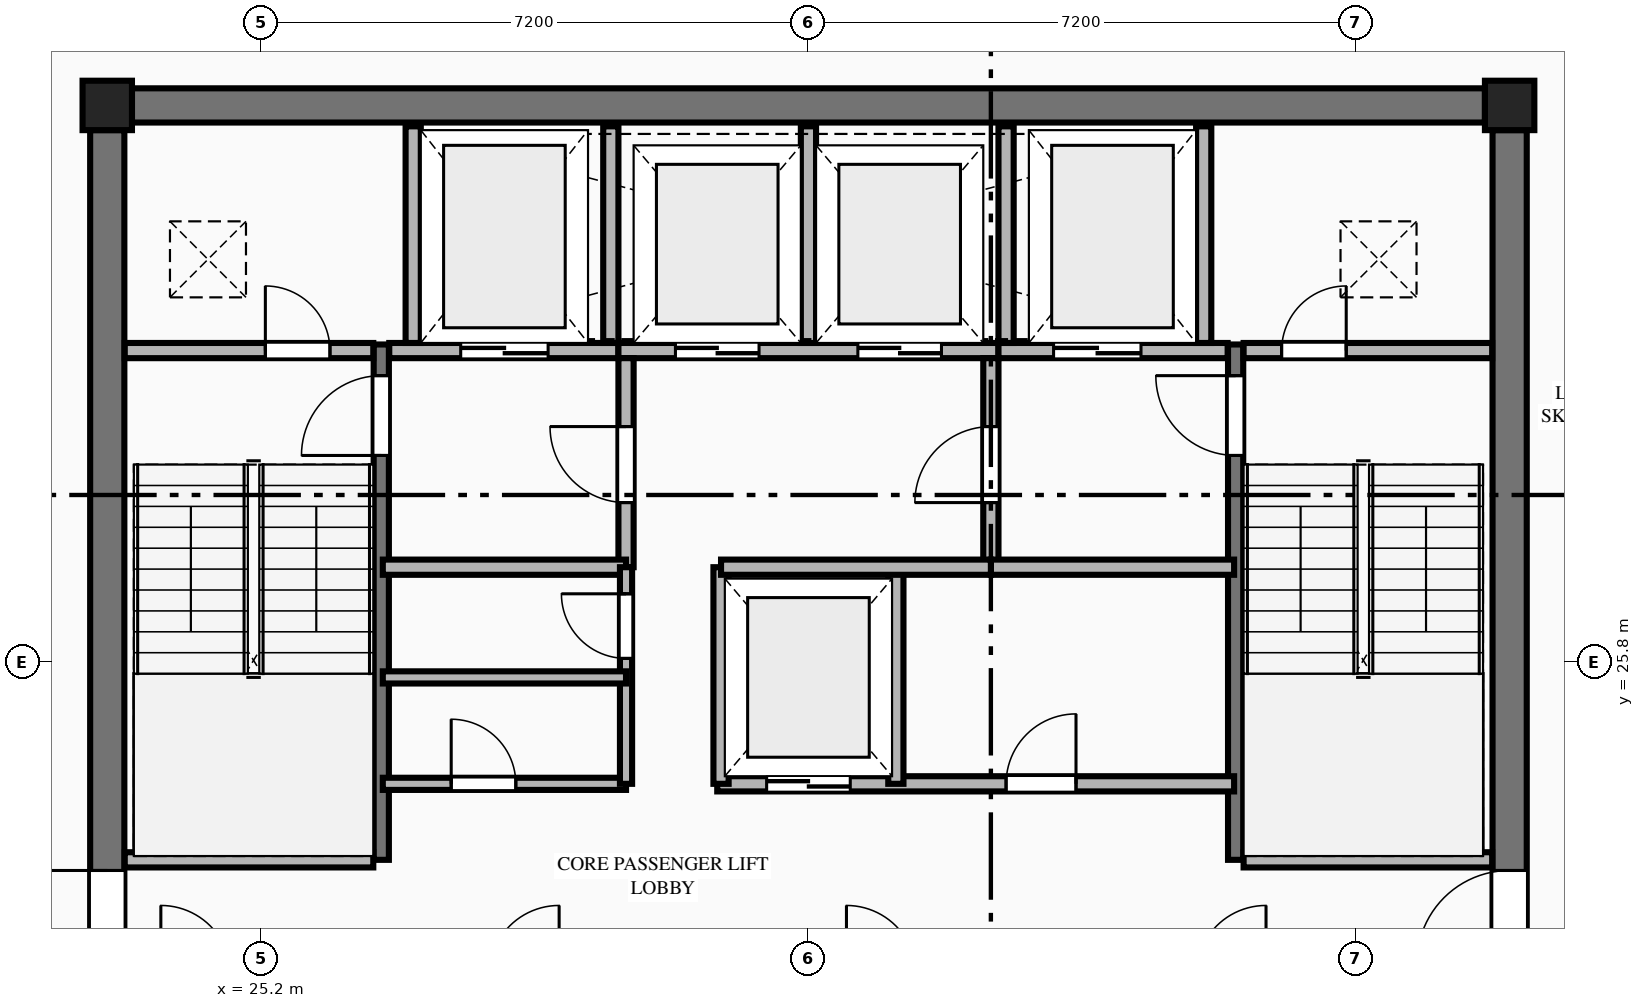
"""IFC4 building model, lengths in metres.
Left out: names, types, materials, properties, quantities, classifications, styles, units other than length and angle.
Written with IfcOpenShell. Run it as: python <this file> out.ifc"""

import sys

from ifc_helpers import new_model, si_unit, direction, frame, frame_2d, origin, origin_2d, place, context, subcontext, project, spatial, rectangle, extrude, element, fill, save


model = new_model("IFC4")
c1 = context("Model", 3, precision=1e-05, world=origin(), true_north=direction((0.0, 1.0)))
c2 = subcontext(c1, "Body", "Model", "MODEL_VIEW")
j1 = project(units=[si_unit("LENGTHUNIT", "METRE"), si_unit("PLANEANGLEUNIT", "RADIAN")], contexts=[c1])
p1 = place(None, origin())
s1 = spatial("IfcSite", under=j1, at=p1, CompositionType="ELEMENT")
p2 = place(p1, origin())
s2 = spatial("IfcBuilding", under=s1, at=p2, CompositionType="ELEMENT")
p3 = place(p2, frame((0.0, 0.0, 267.15)))
s3 = spatial("IfcBuildingStorey", under=s2, at=p3, CompositionType="ELEMENT", Elevation=267.15)
for number, where, z_axis, x_axis in (
    (1, (41.625, 33.125, 0.0), (0.0, 0.0, 1.0), (1.0, 0.0, 0.0)),
    (2, (23.175, 33.125, 0.0), (0.0, 0.0, 1.0), (1.0, 0.0, 0.0)),
):
    element("IfcColumn", number, at=place(p3, frame(where, z_axis=z_axis, x_axis=x_axis)), inside=s3, PredefinedType="COLUMN", context=c2, shape_type="SweptSolid", body=[
        extrude(rectangle(XDim=0.65, YDim=0.65, at=origin_2d()), origin(), (0.0, 0.0, 1.0), 3.65),
    ])
p4 = place(p3, frame((23.5, 33.125, 0.0), z_axis=(0.0, 0.0, 1.0), x_axis=(1.0, 0.0, 0.0)))
e3 = element("IfcWall", 3, at=p4, inside=s3, PredefinedType="SHEAR", context=c2, shape_type="SweptSolid", body=[
    extrude(rectangle(XDim=17.8, YDim=0.45, at=frame_2d((8.9, 0.0))), origin(), (0.0, 0.0, 1.0), 3.45),
])
p5 = place(p3, frame((23.175, 19.0, 0.0), z_axis=(0.0, 0.0, 1.0), x_axis=(0.0, 1.0, 0.0)))
e4 = element("IfcWall", 4, at=p5, inside=s3, PredefinedType="SHEAR", context=c2, shape_type="SweptSolid", body=[
    extrude(rectangle(XDim=13.8, YDim=0.45, at=frame_2d((6.9, 0.0))), origin(), (0.0, 0.0, 1.0), 3.45),
])
p6 = place(p5, frame((2.84, 0.0, 0.0)))
e5 = element("IfcOpeningElement", 5, at=p6, cuts=e4, PredefinedType="OPENING", context=c2, shape_type="SweptSolid", body=[
    extrude(rectangle(XDim=1.22, YDim=2.25, at=frame_2d((0.61, 1.125))), frame((0.0, 0.235, 0.0), z_axis=(0.0, -1.0, 0.0), x_axis=(1.0, 0.0, 0.0)), (0.0, 0.0, 1.0), 0.47),
])
p7 = place(p3, frame((41.625, 19.0, 0.0), z_axis=(0.0, 0.0, 1.0), x_axis=(0.0, 1.0, 0.0)))
e6 = element("IfcWall", 6, at=p7, inside=s3, PredefinedType="SHEAR", context=c2, shape_type="SweptSolid", body=[
    extrude(rectangle(XDim=13.8, YDim=0.45, at=frame_2d((6.9, 0.0))), origin(), (0.0, 0.0, 1.0), 3.45),
])
p8 = place(p7, frame((2.84, 0.0, 0.0)))
e7 = element("IfcOpeningElement", 7, at=p8, cuts=e6, PredefinedType="OPENING", context=c2, shape_type="SweptSolid", body=[
    extrude(rectangle(XDim=1.22, YDim=2.25, at=frame_2d((0.61, 1.125))), frame((0.0, 0.235, 0.0), z_axis=(0.0, -1.0, 0.0), x_axis=(1.0, 0.0, 0.0)), (0.0, 0.0, 1.0), 0.47),
])
p9 = place(p3, frame((26.78, 23.2, 0.0), z_axis=(0.0, 0.0, 1.0), x_axis=(0.0, 1.0, 0.0)))
e8 = element("IfcWall", 8, at=p9, inside=s3, PredefinedType="SHEAR", context=c2, shape_type="SweptSolid", body=[
    extrude(rectangle(XDim=6.78, YDim=0.2, at=frame_2d((3.39, 0.0))), origin(), (0.0, 0.0, 1.0), 3.65),
])
p10 = place(p9, frame((5.32, 0.0, 0.0)))
e9 = element("IfcOpeningElement", 9, at=p10, cuts=e8, PredefinedType="OPENING", context=c2, shape_type="SweptSolid", body=[
    extrude(rectangle(XDim=1.05, YDim=2.15, at=frame_2d((0.525, 1.075))), frame((0.0, 0.11, 0.0), z_axis=(0.0, -1.0, 0.0), x_axis=(1.0, 0.0, 0.0)), (0.0, 0.0, 1.0), 0.22),
])
p11 = place(p3, frame((23.405, 23.2, 0.0), z_axis=(0.0, 0.0, 1.0), x_axis=(1.0, 0.0, 0.0)))
e10 = element("IfcWall", 10, at=p11, inside=s3, PredefinedType="PLUMBINGWALL", context=c2, shape_type="SweptSolid", body=[
    extrude(rectangle(XDim=3.27, YDim=0.2, at=frame_2d((1.635, 0.0))), origin(), (0.0, 0.0, 1.0), 3.45),
])
p12 = place(p3, frame((38.02, 23.2, 0.0), z_axis=(0.0, 0.0, 1.0), x_axis=(0.0, 1.0, 0.0)))
e11 = element("IfcWall", 11, at=p12, inside=s3, PredefinedType="SHEAR", context=c2, shape_type="SweptSolid", body=[
    extrude(rectangle(XDim=6.78, YDim=0.2, at=frame_2d((3.39, 0.0))), origin(), (0.0, 0.0, 1.0), 3.65),
])
p13 = place(p12, frame((5.32, 0.0, 0.0)))
e12 = element("IfcOpeningElement", 12, at=p13, cuts=e11, PredefinedType="OPENING", context=c2, shape_type="SweptSolid", body=[
    extrude(rectangle(XDim=1.05, YDim=2.15, at=frame_2d((0.525, 1.075))), frame((0.0, 0.11, 0.0), z_axis=(0.0, -1.0, 0.0), x_axis=(1.0, 0.0, 0.0)), (0.0, 0.0, 1.0), 0.22),
])
p14 = place(p3, frame((38.125, 23.2, 0.0), z_axis=(0.0, 0.0, 1.0), x_axis=(1.0, 0.0, 0.0)))
e13 = element("IfcWall", 13, at=p14, inside=s3, PredefinedType="PLUMBINGWALL", context=c2, shape_type="SweptSolid", body=[
    extrude(rectangle(XDim=3.27, YDim=0.2, at=frame_2d((1.635, 0.0))), origin(), (0.0, 0.0, 1.0), 3.45),
])
p15 = place(p3, frame((23.405, 29.9, 0.0), z_axis=(0.0, 0.0, 1.0), x_axis=(1.0, 0.0, 0.0)))
e14 = element("IfcWall", 14, at=p15, inside=s3, PredefinedType="PLUMBINGWALL", context=c2, shape_type="SweptSolid", body=[
    extrude(rectangle(XDim=3.27, YDim=0.2, at=frame_2d((1.635, 0.0))), origin(), (0.0, 0.0, 1.0), 3.45),
])
p16 = place(p15, frame((1.85, 0.0, 0.0)))
e15 = element("IfcOpeningElement", 15, at=p16, cuts=e14, PredefinedType="OPENING", context=c2, shape_type="SweptSolid", body=[
    extrude(rectangle(XDim=0.85, YDim=2.05, at=frame_2d((0.425, 1.025))), frame((0.0, 0.11, 0.0), z_axis=(0.0, -1.0, 0.0), x_axis=(1.0, 0.0, 0.0)), (0.0, 0.0, 1.0), 0.22),
])
p17 = place(p3, frame((26.885, 29.9, 0.0), z_axis=(0.0, 0.0, 1.0), x_axis=(1.0, 0.0, 0.0)))
e16 = element("IfcWall", 16, at=p17, inside=s3, PredefinedType="PLUMBINGWALL", context=c2, shape_type="SweptSolid", body=[
    extrude(rectangle(XDim=3.015, YDim=0.2, at=frame_2d((1.507, 0.0))), origin(), (0.0, 0.0, 1.0), 3.45),
])
p18 = place(p17, frame((0.94, 0.0, 0.0)))
e17 = element("IfcOpeningElement", 17, at=p18, cuts=e16, PredefinedType="OPENING", context=c2, shape_type="SweptSolid", body=[
    extrude(rectangle(XDim=1.15, YDim=2.2, at=frame_2d((0.575, 1.1))), frame((0.0, 0.11, 0.0), z_axis=(0.0, -1.0, 0.0), x_axis=(1.0, 0.0, 0.0)), (0.0, 0.0, 1.0), 0.22),
])
p19 = place(p3, frame((29.9, 29.9, 0.0), z_axis=(0.0, 0.0, 1.0), x_axis=(1.0, 0.0, 0.0)))
e18 = element("IfcWall", 18, at=p19, inside=s3, PredefinedType="PLUMBINGWALL", context=c2, shape_type="SweptSolid", body=[
    extrude(rectangle(XDim=5.0, YDim=0.2, at=frame_2d((2.5, 0.0))), origin(), (0.0, 0.0, 1.0), 3.45),
])
p20 = place(p19, frame((0.75, 0.0, 0.0)))
e19 = element("IfcOpeningElement", 19, at=p20, cuts=e18, PredefinedType="OPENING", context=c2, shape_type="SweptSolid", body=[
    extrude(rectangle(XDim=1.1, YDim=2.2, at=frame_2d((0.55, 1.1))), frame((0.0, 0.11, 0.0), z_axis=(0.0, -1.0, 0.0), x_axis=(1.0, 0.0, 0.0)), (0.0, 0.0, 1.0), 0.22),
])
p21 = place(p19, frame((3.15, 0.0, 0.0)))
e20 = element("IfcOpeningElement", 20, at=p21, cuts=e18, PredefinedType="OPENING", context=c2, shape_type="SweptSolid", body=[
    extrude(rectangle(XDim=1.1, YDim=2.2, at=frame_2d((0.55, 1.1))), frame((0.0, 0.11, 0.0), z_axis=(0.0, -1.0, 0.0), x_axis=(1.0, 0.0, 0.0)), (0.0, 0.0, 1.0), 0.22),
])
p22 = place(p3, frame((34.9, 29.9, 0.0), z_axis=(0.0, 0.0, 1.0), x_axis=(1.0, 0.0, 0.0)))
e21 = element("IfcWall", 21, at=p22, inside=s3, PredefinedType="PLUMBINGWALL", context=c2, shape_type="SweptSolid", body=[
    extrude(rectangle(XDim=3.015, YDim=0.2, at=frame_2d((1.508, 0.0))), origin(), (0.0, 0.0, 1.0), 3.45),
])
p23 = place(p22, frame((0.725, 0.0, 0.0)))
e22 = element("IfcOpeningElement", 22, at=p23, cuts=e21, PredefinedType="OPENING", context=c2, shape_type="SweptSolid", body=[
    extrude(rectangle(XDim=1.15, YDim=2.2, at=frame_2d((0.575, 1.1))), frame((0.0, 0.11, 0.0), z_axis=(0.0, -1.0, 0.0), x_axis=(1.0, 0.0, 0.0)), (0.0, 0.0, 1.0), 0.22),
])
p24 = place(p3, frame((38.125, 29.9, 0.0), z_axis=(0.0, 0.0, 1.0), x_axis=(1.0, 0.0, 0.0)))
e23 = element("IfcWall", 23, at=p24, inside=s3, PredefinedType="PLUMBINGWALL", context=c2, shape_type="SweptSolid", body=[
    extrude(rectangle(XDim=3.27, YDim=0.2, at=frame_2d((1.635, 0.0))), origin(), (0.0, 0.0, 1.0), 3.45),
])
p25 = place(p24, frame((0.5, 0.0, 0.0)))
e24 = element("IfcOpeningElement", 24, at=p25, cuts=e23, PredefinedType="OPENING", context=c2, shape_type="SweptSolid", body=[
    extrude(rectangle(XDim=0.85, YDim=2.05, at=frame_2d((0.425, 1.025))), frame((0.0, 0.11, 0.0), z_axis=(0.0, -1.0, 0.0), x_axis=(1.0, 0.0, 0.0)), (0.0, 0.0, 1.0), 0.22),
])
for number, where, z_axis, x_axis in (
    (25, (27.2, 30.0, 0.0), (0.0, 0.0, 1.0), (0.0, 1.0, 0.0)),
    (26, (29.8, 30.0, 0.0), (0.0, 0.0, 1.0), (0.0, 1.0, 0.0)),
    (27, (32.4, 30.0, 0.0), (0.0, 0.0, 1.0), (0.0, 1.0, 0.0)),
    (28, (35.0, 30.0, 0.0), (0.0, 0.0, 1.0), (0.0, 1.0, 0.0)),
    (29, (37.6, 30.0, 0.0), (0.0, 0.0, 1.0), (0.0, 1.0, 0.0)),
):
    element("IfcWall", number, at=place(p3, frame(where, z_axis=z_axis, x_axis=x_axis)), inside=s3, PredefinedType="PLUMBINGWALL", context=c2, shape_type="SweptSolid", body=[
        extrude(rectangle(XDim=2.85, YDim=0.2, at=frame_2d((1.425, 0.0))), origin(), (0.0, 0.0, 1.0), 3.45),
    ])
p26 = place(p3, frame((30.0, 27.05, 0.0), z_axis=(0.0, 0.0, 1.0), x_axis=(0.0, 1.0, 0.0)))
e30 = element("IfcWall", 30, at=p26, inside=s3, PredefinedType="PLUMBINGWALL", context=c2, shape_type="SweptSolid", body=[
    extrude(rectangle(XDim=2.75, YDim=0.2, at=frame_2d((1.375, 0.0))), origin(), (0.0, 0.0, 1.0), 3.45),
])
p27 = place(p26, frame((0.85, 0.0, 0.0)))
e31 = element("IfcOpeningElement", 31, at=p27, cuts=e30, PredefinedType="OPENING", context=c2, shape_type="SweptSolid", body=[
    extrude(rectangle(XDim=1.0, YDim=2.15, at=frame_2d((0.5, 1.075))), frame((0.0, 0.11, 0.0), z_axis=(0.0, -1.0, 0.0), x_axis=(1.0, 0.0, 0.0)), (0.0, 0.0, 1.0), 0.22),
])
p28 = place(p3, frame((26.8, 27.05, 0.0), z_axis=(0.0, 0.0, 1.0), x_axis=(1.0, 0.0, 0.0)))
e32 = element("IfcWall", 32, at=p28, inside=s3, PredefinedType="PLUMBINGWALL", context=c2, shape_type="SweptSolid", body=[
    extrude(rectangle(XDim=3.2, YDim=0.2, at=frame_2d((1.6, 0.0))), origin(), (0.0, 0.0, 1.0), 3.45),
])
p29 = place(p3, frame((34.8, 27.05, 0.0), z_axis=(0.0, 0.0, 1.0), x_axis=(0.0, 1.0, 0.0)))
e33 = element("IfcWall", 33, at=p29, inside=s3, PredefinedType="PLUMBINGWALL", context=c2, shape_type="SweptSolid", body=[
    extrude(rectangle(XDim=2.75, YDim=0.2, at=frame_2d((1.375, 0.0))), origin(), (0.0, 0.0, 1.0), 3.45),
])
p30 = place(p29, frame((0.85, 0.0, 0.0)))
e34 = element("IfcOpeningElement", 34, at=p30, cuts=e33, PredefinedType="OPENING", context=c2, shape_type="SweptSolid", body=[
    extrude(rectangle(XDim=1.0, YDim=2.15, at=frame_2d((0.5, 1.075))), frame((0.0, 0.11, 0.0), z_axis=(0.0, -1.0, 0.0), x_axis=(1.0, 0.0, 0.0)), (0.0, 0.0, 1.0), 0.22),
])
p31 = place(p3, frame((34.8, 27.05, 0.0), z_axis=(0.0, 0.0, 1.0), x_axis=(1.0, 0.0, 0.0)))
e35 = element("IfcWall", 35, at=p31, inside=s3, PredefinedType="PLUMBINGWALL", context=c2, shape_type="SweptSolid", body=[
    extrude(rectangle(XDim=3.2, YDim=0.2, at=frame_2d((1.6, 0.0))), origin(), (0.0, 0.0, 1.0), 3.45),
])
p32 = place(p3, frame((26.8, 24.2, 0.0), z_axis=(0.0, 0.0, 1.0), x_axis=(1.0, 0.0, 0.0)))
e36 = element("IfcWall", 36, at=p32, inside=s3, PredefinedType="PARTITIONING", context=c2, shape_type="SweptSolid", body=[
    extrude(rectangle(XDim=3.2, YDim=0.16, at=frame_2d((1.6, 0.0))), origin(), (0.0, 0.0, 1.0), 3.45),
])
p33 = place(p32, frame((0.9, 0.0, 0.0)))
e37 = element("IfcOpeningElement", 37, at=p33, cuts=e36, PredefinedType="OPENING", context=c2, shape_type="SweptSolid", body=[
    extrude(rectangle(XDim=0.85, YDim=2.05, at=frame_2d((0.425, 1.025))), frame((0.0, 0.09, 0.0), z_axis=(0.0, -1.0, 0.0), x_axis=(1.0, 0.0, 0.0)), (0.0, 0.0, 1.0), 0.18),
])
p34 = place(p3, frame((30.0, 24.2, 0.0), z_axis=(0.0, 0.0, 1.0), x_axis=(0.0, 1.0, 0.0)))
e38 = element("IfcWall", 38, at=p34, inside=s3, PredefinedType="PARTITIONING", context=c2, shape_type="SweptSolid", body=[
    extrude(rectangle(XDim=2.85, YDim=0.16, at=frame_2d((1.425, 0.0))), origin(), (0.0, 0.0, 1.0), 3.45),
])
p35 = place(p34, frame((1.65, 0.0, 0.0)))
e39 = element("IfcOpeningElement", 39, at=p35, cuts=e38, PredefinedType="OPENING", context=c2, shape_type="SweptSolid", body=[
    extrude(rectangle(XDim=0.85, YDim=2.05, at=frame_2d((0.425, 1.025))), frame((0.0, 0.09, 0.0), z_axis=(0.0, -1.0, 0.0), x_axis=(1.0, 0.0, 0.0)), (0.0, 0.0, 1.0), 0.18),
])
p36 = place(p3, frame((31.2, 24.2, 0.0), z_axis=(0.0, 0.0, 1.0), x_axis=(1.0, 0.0, 0.0)))
e40 = element("IfcWall", 40, at=p36, inside=s3, PredefinedType="PLUMBINGWALL", context=c2, shape_type="SweptSolid", body=[
    extrude(rectangle(XDim=6.8, YDim=0.2, at=frame_2d((3.4, 0.0))), origin(), (0.0, 0.0, 1.0), 3.45),
])
p37 = place(p36, frame((0.65, 0.0, 0.0)))
e41 = element("IfcOpeningElement", 41, at=p37, cuts=e40, PredefinedType="OPENING", context=c2, shape_type="SweptSolid", body=[
    extrude(rectangle(XDim=1.1, YDim=2.2, at=frame_2d((0.55, 1.1))), frame((0.0, 0.11, 0.0), z_axis=(0.0, -1.0, 0.0), x_axis=(1.0, 0.0, 0.0)), (0.0, 0.0, 1.0), 0.22),
])
p38 = place(p36, frame((3.8, 0.0, 0.0)))
e42 = element("IfcOpeningElement", 42, at=p38, cuts=e40, PredefinedType="OPENING", context=c2, shape_type="SweptSolid", body=[
    extrude(rectangle(XDim=0.92, YDim=2.15, at=frame_2d((0.46, 1.075))), frame((0.0, 0.11, 0.0), z_axis=(0.0, -1.0, 0.0), x_axis=(1.0, 0.0, 0.0)), (0.0, 0.0, 1.0), 0.22),
])
for number, where, z_axis, x_axis in (
    (43, (31.25, 24.2, 0.0), (0.0, 0.0, 1.0), (0.0, 1.0, 0.0)),
    (44, (33.55, 24.2, 0.0), (0.0, 0.0, 1.0), (0.0, 1.0, 0.0)),
):
    element("IfcWall", number, at=place(p3, frame(where, z_axis=z_axis, x_axis=x_axis)), inside=s3, PredefinedType="PLUMBINGWALL", context=c2, shape_type="SweptSolid", body=[
        extrude(rectangle(XDim=2.85, YDim=0.2, at=frame_2d((1.425, 0.0))), origin(), (0.0, 0.0, 1.0), 3.45),
    ])
p39 = place(p3, frame((31.25, 27.05, 0.0), z_axis=(0.0, 0.0, 1.0), x_axis=(1.0, 0.0, 0.0)))
e45 = element("IfcWall", 45, at=p39, inside=s3, PredefinedType="PLUMBINGWALL", context=c2, shape_type="SweptSolid", body=[
    extrude(rectangle(XDim=3.55, YDim=0.2, at=frame_2d((1.775, 0.0))), origin(), (0.0, 0.0, 1.0), 3.45),
])
p40 = place(p3, frame((26.8, 25.6, 0.0), z_axis=(0.0, 0.0, 1.0), x_axis=(1.0, 0.0, 0.0)))
e46 = element("IfcWall", 46, at=p40, inside=s3, PredefinedType="PARTITIONING", context=c2, shape_type="SweptSolid", body=[
    extrude(rectangle(XDim=3.2, YDim=0.16, at=frame_2d((1.6, 0.0))), origin(), (0.0, 0.0, 1.0), 3.45),
])
p41 = place(p6, origin())
e47 = element("IfcDoor", 47, at=p41, inside=s3, OperationType="SINGLE_SWING_RIGHT", PredefinedType="DOOR", context=c2, shape_type="SweptSolid", body=[
    extrude(rectangle(XDim=1.22, YDim=2.25, at=frame_2d((0.61, 1.125))), frame((0.0, 0.025, 0.0), z_axis=(0.0, -1.0, 0.0), x_axis=(1.0, 0.0, 0.0)), (0.0, 0.0, 1.0), 0.05),
])
fill(e5, e47)
p42 = place(p8, origin())
e48 = element("IfcDoor", 48, at=p42, inside=s3, OperationType="SINGLE_SWING_LEFT", PredefinedType="DOOR", context=c2, shape_type="SweptSolid", body=[
    extrude(rectangle(XDim=1.22, YDim=2.25, at=frame_2d((0.61, 1.125))), frame((0.0, 0.025, 0.0), z_axis=(0.0, -1.0, 0.0), x_axis=(1.0, 0.0, 0.0)), (0.0, 0.0, 1.0), 0.05),
])
fill(e7, e48)
p43 = place(p10, origin())
e49 = element("IfcDoor", 49, at=p43, inside=s3, OperationType="SINGLE_SWING_LEFT", PredefinedType="DOOR", context=c2, shape_type="SweptSolid", body=[
    extrude(rectangle(XDim=1.05, YDim=2.15, at=frame_2d((0.525, 1.075))), frame((0.0, 0.025, 0.0), z_axis=(0.0, -1.0, 0.0), x_axis=(1.0, 0.0, 0.0)), (0.0, 0.0, 1.0), 0.05),
])
fill(e9, e49)
p44 = place(p13, origin())
e50 = element("IfcDoor", 50, at=p44, inside=s3, OperationType="SINGLE_SWING_RIGHT", PredefinedType="DOOR", context=c2, shape_type="SweptSolid", body=[
    extrude(rectangle(XDim=1.05, YDim=2.15, at=frame_2d((0.525, 1.075))), frame((0.0, 0.025, 0.0), z_axis=(0.0, -1.0, 0.0), x_axis=(1.0, 0.0, 0.0)), (0.0, 0.0, 1.0), 0.05),
])
fill(e12, e50)
p45 = place(p16, origin())
e51 = element("IfcDoor", 51, at=p45, inside=s3, OperationType="SINGLE_SWING_LEFT", PredefinedType="DOOR", context=c2, shape_type="SweptSolid", body=[
    extrude(rectangle(XDim=0.85, YDim=2.05, at=frame_2d((0.425, 1.025))), frame((0.0, 0.025, 0.0), z_axis=(0.0, -1.0, 0.0), x_axis=(1.0, 0.0, 0.0)), (0.0, 0.0, 1.0), 0.05),
])
fill(e15, e51)
p46 = place(p25, origin())
e52 = element("IfcDoor", 52, at=p46, inside=s3, OperationType="SINGLE_SWING_RIGHT", PredefinedType="DOOR", context=c2, shape_type="SweptSolid", body=[
    extrude(rectangle(XDim=0.85, YDim=2.05, at=frame_2d((0.425, 1.025))), frame((0.0, 0.025, 0.0), z_axis=(0.0, -1.0, 0.0), x_axis=(1.0, 0.0, 0.0)), (0.0, 0.0, 1.0), 0.05),
])
fill(e24, e52)
p47 = place(p18, origin())
e53 = element("IfcDoor", 53, at=p47, inside=s3, OperationType="DOUBLE_DOOR_SLIDING", PredefinedType="DOOR", context=c2, shape_type="SweptSolid", body=[
    extrude(rectangle(XDim=1.15, YDim=2.2, at=frame_2d((0.575, 1.1))), frame((0.0, 0.025, 0.0), z_axis=(0.0, -1.0, 0.0), x_axis=(1.0, 0.0, 0.0)), (0.0, 0.0, 1.0), 0.05),
])
fill(e17, e53)
p48 = place(p23, origin())
e54 = element("IfcDoor", 54, at=p48, inside=s3, OperationType="DOUBLE_DOOR_SLIDING", PredefinedType="DOOR", context=c2, shape_type="SweptSolid", body=[
    extrude(rectangle(XDim=1.15, YDim=2.2, at=frame_2d((0.575, 1.1))), frame((0.0, 0.025, 0.0), z_axis=(0.0, -1.0, 0.0), x_axis=(1.0, 0.0, 0.0)), (0.0, 0.0, 1.0), 0.05),
])
fill(e22, e54)
p49 = place(p20, origin())
e55 = element("IfcDoor", 55, at=p49, inside=s3, OperationType="DOUBLE_DOOR_SLIDING", PredefinedType="DOOR", context=c2, shape_type="SweptSolid", body=[
    extrude(rectangle(XDim=1.1, YDim=2.2, at=frame_2d((0.55, 1.1))), frame((0.0, 0.025, 0.0), z_axis=(0.0, -1.0, 0.0), x_axis=(1.0, 0.0, 0.0)), (0.0, 0.0, 1.0), 0.05),
])
fill(e19, e55)
p50 = place(p21, origin())
e56 = element("IfcDoor", 56, at=p50, inside=s3, OperationType="DOUBLE_DOOR_SLIDING", PredefinedType="DOOR", context=c2, shape_type="SweptSolid", body=[
    extrude(rectangle(XDim=1.1, YDim=2.2, at=frame_2d((0.55, 1.1))), frame((0.0, 0.025, 0.0), z_axis=(0.0, -1.0, 0.0), x_axis=(1.0, 0.0, 0.0)), (0.0, 0.0, 1.0), 0.05),
])
fill(e20, e56)
p51 = place(p27, origin())
e57 = element("IfcDoor", 57, at=p51, inside=s3, OperationType="SINGLE_SWING_RIGHT", PredefinedType="DOOR", context=c2, shape_type="SweptSolid", body=[
    extrude(rectangle(XDim=1.0, YDim=2.15, at=frame_2d((0.5, 1.075))), frame((0.0, 0.025, 0.0), z_axis=(0.0, -1.0, 0.0), x_axis=(1.0, 0.0, 0.0)), (0.0, 0.0, 1.0), 0.05),
])
fill(e31, e57)
p52 = place(p30, origin())
e58 = element("IfcDoor", 58, at=p52, inside=s3, OperationType="SINGLE_SWING_LEFT", PredefinedType="DOOR", context=c2, shape_type="SweptSolid", body=[
    extrude(rectangle(XDim=1.0, YDim=2.15, at=frame_2d((0.5, 1.075))), frame((0.0, 0.025, 0.0), z_axis=(0.0, -1.0, 0.0), x_axis=(1.0, 0.0, 0.0)), (0.0, 0.0, 1.0), 0.05),
])
fill(e34, e58)
p53 = place(p37, origin())
e59 = element("IfcDoor", 59, at=p53, inside=s3, OperationType="DOUBLE_DOOR_SLIDING", PredefinedType="DOOR", context=c2, shape_type="SweptSolid", body=[
    extrude(rectangle(XDim=1.1, YDim=2.2, at=frame_2d((0.55, 1.1))), frame((0.0, 0.025, 0.0), z_axis=(0.0, -1.0, 0.0), x_axis=(1.0, 0.0, 0.0)), (0.0, 0.0, 1.0), 0.05),
])
fill(e41, e59)
p54 = place(p33, origin())
e60 = element("IfcDoor", 60, at=p54, inside=s3, OperationType="SINGLE_SWING_LEFT", PredefinedType="DOOR", context=c2, shape_type="SweptSolid", body=[
    extrude(rectangle(XDim=0.85, YDim=2.05, at=frame_2d((0.425, 1.025))), frame((0.0, 0.025, 0.0), z_axis=(0.0, -1.0, 0.0), x_axis=(1.0, 0.0, 0.0)), (0.0, 0.0, 1.0), 0.05),
])
fill(e37, e60)
p55 = place(p35, origin())
e61 = element("IfcDoor", 61, at=p55, inside=s3, OperationType="SINGLE_SWING_RIGHT", PredefinedType="DOOR", context=c2, shape_type="SweptSolid", body=[
    extrude(rectangle(XDim=0.85, YDim=2.05, at=frame_2d((0.425, 1.025))), frame((0.0, 0.025, 0.0), z_axis=(0.0, -1.0, 0.0), x_axis=(1.0, 0.0, 0.0)), (0.0, 0.0, 1.0), 0.05),
])
fill(e39, e61)
p56 = place(p38, origin())
e62 = element("IfcDoor", 62, at=p56, inside=s3, OperationType="SINGLE_SWING_RIGHT", PredefinedType="DOOR", context=c2, shape_type="SweptSolid", body=[
    extrude(rectangle(XDim=0.92, YDim=2.15, at=frame_2d((0.46, 1.075))), frame((0.0, 0.025, 0.0), z_axis=(0.0, -1.0, 0.0), x_axis=(1.0, 0.0, 0.0)), (0.0, 0.0, 1.0), 0.05),
])
fill(e42, e62)
save(model, sys.argv[1])
